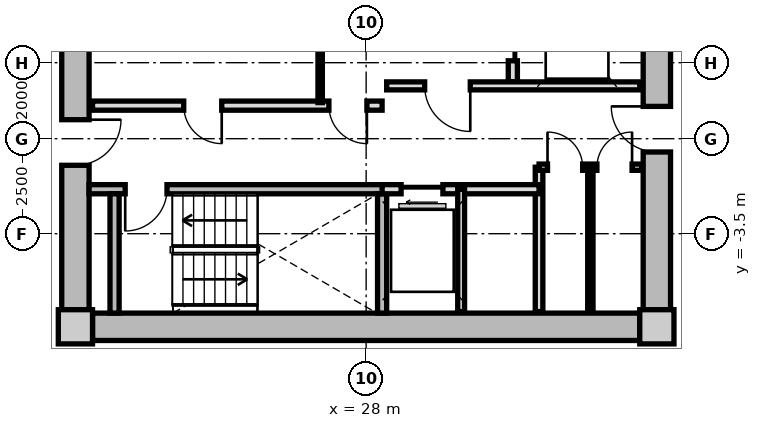
"""IFC4 building model, lengths in metres.
Left out: names, types, materials, properties, quantities, classifications, styles, units other than length and angle.
Written with IfcOpenShell. Run it as: python <this file> out.ifc"""

import sys

from ifc_helpers import new_model, si_unit, direction, frame, frame_2d, origin, origin_2d, place, context, subcontext, project, spatial, rectangle, extrude, source, transform, mapped, element, fill, save


model = new_model("IFC4")
c1 = context("Model", 3, precision=1e-05, world=origin(), true_north=direction((0.0, 1.0)))
c2 = subcontext(c1, "Body", "Model", "MODEL_VIEW")
j1 = project(units=[si_unit("LENGTHUNIT", "METRE"), si_unit("PLANEANGLEUNIT", "RADIAN")], contexts=[c1])
p1 = place(None, origin())
s1 = spatial("IfcSite", under=j1, at=p1, CompositionType="ELEMENT")
p2 = place(p1, origin())
s2 = spatial("IfcBuilding", under=s1, at=p2, CompositionType="ELEMENT")
p3 = place(p2, frame((0.0, 0.0, 108.45)))
s3 = spatial("IfcBuildingStorey", under=s2, at=p3, CompositionType="ELEMENT", Elevation=108.45)
m1 = source(origin(), c2, "Body", "SweptSolid", [
    extrude(rectangle(XDim=0.9, YDim=0.9, at=origin_2d()), origin(), (0.0, 0.0, 1.0), 3.05),
])
for number, where, z_axis, x_axis in (
    (1, (20.35, -5.95, 0.0), (0.0, 0.0, 1.0), (1.0, 0.0, 0.0)),
    (2, (35.65, -5.95, 0.0), (0.0, 0.0, 1.0), (1.0, 0.0, 0.0)),
):
    element("IfcColumn", number, at=place(p3, frame(where, z_axis=z_axis, x_axis=x_axis)), inside=s3, PredefinedType="COLUMN", context=c2, shape_type="MappedRepresentation", body=[
        mapped(m1, transform((0.0, 0.0, 0.0), x_axis=(1.0, 0.0, 0.0), y_axis=(0.0, 1.0, 0.0), z_axis=(0.0, 0.0, 1.0), scale=1.0)),
    ])
m2 = source(origin(), c2, "Body", "SweptSolid", [
    extrude(rectangle(XDim=14.4, YDim=0.72, at=frame_2d((7.2, 0.0))), origin(), (0.0, 0.0, 1.0), 2.79),
])
p4 = place(p3, frame((35.2, -5.95, 0.0), z_axis=(0.0, 0.0, 1.0), x_axis=(-1.0, 0.0, 0.0)))
e3 = element("IfcWall", 3, at=p4, inside=s3, PredefinedType="SHEAR", context=c2, shape_type="MappedRepresentation", body=[
    mapped(m2, transform((0.0, 0.0, 0.0), x_axis=(1.0, 0.0, 0.0), y_axis=(0.0, 1.0, 0.0), z_axis=(0.0, 0.0, 1.0), scale=1.0)),
])
m3 = source(origin(), c2, "Body", "SweptSolid", [
    extrude(rectangle(XDim=11.0, YDim=0.72, at=frame_2d((5.5, 0.0))), origin(), (0.0, 0.0, 1.0), 2.79),
])
p5 = place(p3, frame((20.35, -5.5, 0.0), z_axis=(0.0, 0.0, 1.0), x_axis=(0.0, 1.0, 0.0)))
e4 = element("IfcWall", 4, at=p5, inside=s3, PredefinedType="SHEAR", context=c2, shape_type="MappedRepresentation", body=[
    mapped(m3, transform((0.0, 0.0, 0.0), x_axis=(1.0, 0.0, 0.0), y_axis=(0.0, 1.0, 0.0), z_axis=(0.0, 0.0, 1.0), scale=1.0)),
])
p6 = place(p5, frame((3.8, 0.0, 0.0)))
e5 = element("IfcOpeningElement", 5, at=p6, cuts=e4, PredefinedType="OPENING", context=c2, shape_type="SweptSolid", body=[
    extrude(rectangle(XDim=1.2, YDim=2.15, at=frame_2d((0.6, 1.075))), frame((0.0, 0.37, 0.0), z_axis=(0.0, -1.0, 0.0), x_axis=(1.0, 0.0, 0.0)), (0.0, 0.0, 1.0), 0.74),
])
p7 = place(p3, frame((35.65, 5.5, 0.0), z_axis=(0.0, 0.0, 1.0), x_axis=(0.0, -1.0, 0.0)))
e6 = element("IfcWall", 6, at=p7, inside=s3, PredefinedType="SHEAR", context=c2, shape_type="MappedRepresentation", body=[
    mapped(m3, transform((0.0, 0.0, 0.0), x_axis=(1.0, 0.0, 0.0), y_axis=(0.0, 1.0, 0.0), z_axis=(0.0, 0.0, 1.0), scale=1.0)),
])
p8 = place(p7, frame((5.65, 0.0, 0.0)))
e7 = element("IfcOpeningElement", 7, at=p8, cuts=e6, PredefinedType="OPENING", context=c2, shape_type="SweptSolid", body=[
    extrude(rectangle(XDim=1.2, YDim=2.15, at=frame_2d((0.6, 1.075))), frame((0.0, 0.37, 0.0), z_axis=(0.0, -1.0, 0.0), x_axis=(1.0, 0.0, 0.0)), (0.0, 0.0, 1.0), 0.74),
])
m4 = source(origin(), c2, "Body", "SweptSolid", [
    extrude(rectangle(XDim=7.83, YDim=0.24, at=frame_2d((3.915, 0.0))), origin(), (0.0, 0.0, 1.0), 2.79),
])
p9 = place(p3, frame((20.71, -2.33, 0.0), z_axis=(0.0, 0.0, 1.0), x_axis=(1.0, 0.0, 0.0)))
e8 = element("IfcWall", 8, at=p9, inside=s3, PredefinedType="PARTITIONING", context=c2, shape_type="MappedRepresentation", body=[
    mapped(m4, transform((0.0, 0.0, 0.0), x_axis=(1.0, 0.0, 0.0), y_axis=(0.0, 1.0, 0.0), z_axis=(0.0, 0.0, 1.0), scale=1.0)),
])
p10 = place(p9, frame((0.95, 0.0, 0.0)))
e9 = element("IfcOpeningElement", 9, at=p10, cuts=e8, PredefinedType="OPENING", context=c2, shape_type="SweptSolid", body=[
    extrude(rectangle(XDim=1.1, YDim=2.15, at=frame_2d((0.55, 1.075))), frame((0.0, 0.13, 0.0), z_axis=(0.0, -1.0, 0.0), x_axis=(1.0, 0.0, 0.0)), (0.0, 0.0, 1.0), 0.26),
])
m5 = source(origin(), c2, "Body", "SweptSolid", [
    extrude(rectangle(XDim=3.14, YDim=0.24, at=frame_2d((1.57, 0.0))), origin(), (0.0, 0.0, 1.0), 2.79),
])
for number, where, z_axis, x_axis in (
    (10, (21.38, -5.59, 0.0), (0.0, 0.0, 1.0), (0.0, 1.0, 0.0)),
    (11, (28.42, -5.59, 0.0), (0.0, 0.0, 1.0), (0.0, 1.0, 0.0)),
):
    element("IfcWall", number, at=place(p3, frame(where, z_axis=z_axis, x_axis=x_axis)), inside=s3, PredefinedType="PARTITIONING", context=c2, shape_type="MappedRepresentation", body=[
        mapped(m5, transform((0.0, 0.0, 0.0), x_axis=(1.0, 0.0, 0.0), y_axis=(0.0, 1.0, 0.0), z_axis=(0.0, 0.0, 1.0), scale=1.0)),
    ])
m6 = source(origin(), c2, "Body", "SweptSolid", [
    extrude(rectangle(XDim=5.0, YDim=0.24, at=frame_2d((2.5, 0.0))), origin(), (0.0, 0.0, 1.0), 2.775),
])
p11 = place(p3, frame((31.86, 0.5, 0.0), z_axis=(0.0, 0.0, 1.0), x_axis=(0.0, 1.0, 0.0)))
e12 = element("IfcWall", 12, at=p11, inside=s3, PredefinedType="PARTITIONING", context=c2, shape_type="MappedRepresentation", body=[
    mapped(m6, transform((0.0, 0.0, 0.0), x_axis=(1.0, 0.0, 0.0), y_axis=(0.0, 1.0, 0.0), z_axis=(0.0, 0.0, 1.0), scale=1.0)),
])
p12 = place(p11, frame((3.05, 0.0, 0.0)))
e13 = element("IfcOpeningElement", 13, at=p12, cuts=e12, PredefinedType="OPENING", context=c2, shape_type="SweptSolid", body=[
    extrude(rectangle(XDim=1.3, YDim=2.2, at=frame_2d((0.65, 1.1))), frame((0.0, 0.13, 0.0), z_axis=(0.0, -1.0, 0.0), x_axis=(1.0, 0.0, 0.0)), (0.0, 0.0, 1.0), 0.26),
])
p13 = place(p11, frame((0.55, 0.0, 0.0)))
e14 = element("IfcOpeningElement", 14, at=p13, cuts=e12, PredefinedType="OPENING", context=c2, shape_type="SweptSolid", body=[
    extrude(rectangle(XDim=1.3, YDim=2.2, at=frame_2d((0.65, 1.1))), frame((0.0, 0.13, 0.0), z_axis=(0.0, -1.0, 0.0), x_axis=(1.0, 0.0, 0.0)), (0.0, 0.0, 1.0), 0.26),
])
m7 = source(origin(), c2, "Body", "SweptSolid", [
    extrude(rectangle(XDim=6.66, YDim=0.21, at=frame_2d((3.33, 0.0))), origin(), (0.0, 0.0, 1.0), 2.775),
])
p14 = place(p3, frame((28.54, 0.39, 0.0), z_axis=(0.0, 0.0, 1.0), x_axis=(1.0, 0.0, 0.0)))
e15 = element("IfcWall", 15, at=p14, inside=s3, PredefinedType="PARTITIONING", context=c2, shape_type="MappedRepresentation", body=[
    mapped(m7, transform((0.0, 0.0, 0.0), x_axis=(1.0, 0.0, 0.0), y_axis=(0.0, 1.0, 0.0), z_axis=(0.0, 0.0, 1.0), scale=1.0)),
])
p15 = place(p14, frame((1.0, 0.0, 0.0)))
e16 = element("IfcOpeningElement", 16, at=p15, cuts=e15, PredefinedType="OPENING", context=c2, shape_type="SweptSolid", body=[
    extrude(rectangle(XDim=1.2, YDim=2.15, at=frame_2d((0.6, 1.075))), frame((0.0, 0.115, 0.0), z_axis=(0.0, -1.0, 0.0), x_axis=(1.0, 0.0, 0.0)), (0.0, 0.0, 1.0), 0.23),
])
m8 = source(origin(), c2, "Body", "SweptSolid", [
    extrude(rectangle(XDim=7.62, YDim=0.24, at=frame_2d((3.81, 0.0))), origin(), (0.0, 0.0, 1.0), 2.775),
])
p16 = place(p3, frame((20.8, -0.13, 0.0), z_axis=(0.0, 0.0, 1.0), x_axis=(1.0, 0.0, 0.0)))
e17 = element("IfcWall", 17, at=p16, inside=s3, PredefinedType="PARTITIONING", context=c2, shape_type="MappedRepresentation", body=[
    mapped(m8, transform((0.0, 0.0, 0.0), x_axis=(1.0, 0.0, 0.0), y_axis=(0.0, 1.0, 0.0), z_axis=(0.0, 0.0, 1.0), scale=1.0)),
])
p17 = place(p16, frame((6.22, 0.0, 0.0)))
e18 = element("IfcOpeningElement", 18, at=p17, cuts=e17, PredefinedType="OPENING", context=c2, shape_type="SweptSolid", body=[
    extrude(rectangle(XDim=1.0, YDim=2.1, at=frame_2d((0.5, 1.05))), frame((0.0, 0.13, 0.0), z_axis=(0.0, -1.0, 0.0), x_axis=(1.0, 0.0, 0.0)), (0.0, 0.0, 1.0), 0.26),
])
p18 = place(p16, frame((2.4, 0.0, 0.0)))
e19 = element("IfcOpeningElement", 19, at=p18, cuts=e17, PredefinedType="OPENING", context=c2, shape_type="SweptSolid", body=[
    extrude(rectangle(XDim=1.0, YDim=2.1, at=frame_2d((0.5, 1.05))), frame((0.0, 0.13, 0.0), z_axis=(0.0, -1.0, 0.0), x_axis=(1.0, 0.0, 0.0)), (0.0, 0.0, 1.0), 0.26),
])
m9 = source(origin(), c2, "Body", "SweptSolid", [
    extrude(rectangle(XDim=2.33, YDim=0.115, at=frame_2d((1.165, 0.0))), origin(), (0.0, 0.0, 1.0), 2.775),
])
p19 = place(p3, frame((26.79, -0.05, 0.0), z_axis=(0.0, 0.0, 1.0), x_axis=(0.0, 1.0, 0.0)))
e20 = element("IfcWall", 20, at=p19, inside=s3, PredefinedType="PARTITIONING", context=c2, shape_type="MappedRepresentation", body=[
    mapped(m9, transform((0.0, 0.0, 0.0), x_axis=(1.0, 0.0, 0.0), y_axis=(0.0, 1.0, 0.0), z_axis=(0.0, 0.0, 1.0), scale=1.0)),
])
m10 = source(origin(), c2, "Body", "SweptSolid", [
    extrude(rectangle(XDim=3.8, YDim=0.2, at=frame_2d((1.9, 0.0))), origin(), (0.0, 0.0, 1.0), 2.775),
])
p20 = place(p3, frame((32.55, -5.55, 0.0), z_axis=(0.0, 0.0, 1.0), x_axis=(0.0, 1.0, 0.0)))
e21 = element("IfcWall", 21, at=p20, inside=s3, PredefinedType="PARTITIONING", context=c2, shape_type="MappedRepresentation", body=[
    mapped(m10, transform((0.0, 0.0, 0.0), x_axis=(1.0, 0.0, 0.0), y_axis=(0.0, 1.0, 0.0), z_axis=(0.0, 0.0, 1.0), scale=1.0)),
])
m11 = source(origin(), c2, "Body", "SweptSolid", [
    extrude(rectangle(XDim=4.13, YDim=0.24, at=frame_2d((2.065, 0.0))), origin(), (0.0, 0.0, 1.0), 2.775),
])
p21 = place(p3, frame((28.42, -2.33, 0.0), z_axis=(0.0, 0.0, 1.0), x_axis=(1.0, 0.0, 0.0)))
e22 = element("IfcWall", 22, at=p21, inside=s3, PredefinedType="PARTITIONING", context=c2, shape_type="MappedRepresentation", body=[
    mapped(m11, transform((0.0, 0.0, 0.0), x_axis=(1.0, 0.0, 0.0), y_axis=(0.0, 1.0, 0.0), z_axis=(0.0, 0.0, 1.0), scale=1.0)),
])
p22 = place(p21, frame((0.5, 0.0, 0.0)))
e23 = element("IfcOpeningElement", 23, at=p22, cuts=e22, PredefinedType="OPENING", context=c2, shape_type="SweptSolid", body=[
    extrude(rectangle(XDim=1.1, YDim=2.2, at=frame_2d((0.55, 1.1))), frame((0.0, 0.13, 0.0), z_axis=(0.0, -1.0, 0.0), x_axis=(1.0, 0.0, 0.0)), (0.0, 0.0, 1.0), 0.26),
])
m12 = source(origin(), c2, "Body", "SweptSolid", [
    extrude(rectangle(XDim=3.22, YDim=0.18, at=frame_2d((1.61, 0.0))), origin(), (0.0, 0.0, 1.0), 2.775),
])
p23 = place(p3, frame((30.5, -5.55, 0.0), z_axis=(0.0, 0.0, 1.0), x_axis=(0.0, 1.0, 0.0)))
e24 = element("IfcWall", 24, at=p23, inside=s3, PredefinedType="PARTITIONING", context=c2, shape_type="MappedRepresentation", body=[
    mapped(m12, transform((0.0, 0.0, 0.0), x_axis=(1.0, 0.0, 0.0), y_axis=(0.0, 1.0, 0.0), z_axis=(0.0, 0.0, 1.0), scale=1.0)),
])
m13 = source(origin(), c2, "Body", "SweptSolid", [
    extrude(rectangle(XDim=2.7, YDim=0.165, at=frame_2d((1.35, 0.0))), origin(), (0.0, 0.0, 1.0), 2.775),
])
p24 = place(p3, frame((32.55, -1.75, 0.0), z_axis=(0.0, 0.0, 1.0), x_axis=(1.0, 0.0, 0.0)))
e25 = element("IfcWall", 25, at=p24, inside=s3, PredefinedType="PARTITIONING", context=c2, shape_type="MappedRepresentation", body=[
    mapped(m13, transform((0.0, 0.0, 0.0), x_axis=(1.0, 0.0, 0.0), y_axis=(0.0, 1.0, 0.0), z_axis=(0.0, 0.0, 1.0), scale=1.0)),
])
p25 = place(p24, frame((0.222, 0.0, 0.0)))
e26 = element("IfcOpeningElement", 26, at=p25, cuts=e25, PredefinedType="OPENING", context=c2, shape_type="SweptSolid", body=[
    extrude(rectangle(XDim=0.925, YDim=2.1, at=frame_2d((0.462, 1.05))), frame((0.0, 0.093, 0.0), z_axis=(0.0, -1.0, 0.0), x_axis=(1.0, 0.0, 0.0)), (0.0, 0.0, 1.0), 0.185),
])
p26 = place(p24, frame((1.522, 0.0, 0.0)))
e27 = element("IfcOpeningElement", 27, at=p26, cuts=e25, PredefinedType="OPENING", context=c2, shape_type="SweptSolid", body=[
    extrude(rectangle(XDim=0.925, YDim=2.1, at=frame_2d((0.462, 1.05))), frame((0.0, 0.093, 0.0), z_axis=(0.0, -1.0, 0.0), x_axis=(1.0, 0.0, 0.0)), (0.0, 0.0, 1.0), 0.185),
])
m14 = source(origin(), c2, "Body", "SweptSolid", [
    extrude(rectangle(XDim=3.8, YDim=0.14, at=frame_2d((1.9, 0.0))), origin(), (0.0, 0.0, 1.0), 2.775),
])
p27 = place(p3, frame((33.9, -5.55, 0.0), z_axis=(0.0, 0.0, 1.0), x_axis=(0.0, 1.0, 0.0)))
e28 = element("IfcWall", 28, at=p27, inside=s3, PredefinedType="PARTITIONING", context=c2, shape_type="MappedRepresentation", body=[
    mapped(m14, transform((0.0, 0.0, 0.0), x_axis=(1.0, 0.0, 0.0), y_axis=(0.0, 1.0, 0.0), z_axis=(0.0, 0.0, 1.0), scale=1.0)),
])
m15 = source(origin(), c2, "Body", "SweptSolid", [
    extrude(rectangle(XDim=1.1, YDim=2.15, at=frame_2d((0.55, 1.075))), frame((0.0, 0.025, 0.0), z_axis=(0.0, -1.0, 0.0), x_axis=(1.0, 0.0, 0.0)), (0.0, 0.0, 1.0), 0.05),
])
p28 = place(p10, frame((1.1, 0.0, 0.0), z_axis=(0.0, 0.0, 1.0), x_axis=(-1.0, 0.0, 0.0)))
e29 = element("IfcDoor", 29, at=p28, inside=s3, OperationType="SINGLE_SWING_RIGHT", PredefinedType="DOOR", context=c2, shape_type="MappedRepresentation", body=[
    mapped(m15, transform((0.0, 0.0, 0.0), x_axis=(1.0, 0.0, 0.0), y_axis=(0.0, 1.0, 0.0), z_axis=(0.0, 0.0, 1.0), scale=1.0)),
])
fill(e9, e29)
m16 = source(origin(), c2, "Body", "SweptSolid", [
    extrude(rectangle(XDim=1.3, YDim=2.2, at=frame_2d((0.65, 1.1))), frame((0.0, 0.025, 0.0), z_axis=(0.0, -1.0, 0.0), x_axis=(1.0, 0.0, 0.0)), (0.0, 0.0, 1.0), 0.05),
])
p29 = place(p13, origin())
e30 = element("IfcDoor", 30, at=p29, inside=s3, OperationType="SLIDING_TO_RIGHT", PredefinedType="DOOR", context=c2, shape_type="MappedRepresentation", body=[
    mapped(m16, transform((0.0, 0.0, 0.0), x_axis=(1.0, 0.0, 0.0), y_axis=(0.0, 1.0, 0.0), z_axis=(0.0, 0.0, 1.0), scale=1.0)),
])
fill(e14, e30)
m17 = source(origin(), c2, "Body", "SweptSolid", [
    extrude(rectangle(XDim=1.2, YDim=2.15, at=frame_2d((0.6, 1.075))), frame((0.0, 0.025, 0.0), z_axis=(0.0, -1.0, 0.0), x_axis=(1.0, 0.0, 0.0)), (0.0, 0.0, 1.0), 0.05),
])
p30 = place(p15, frame((1.2, 0.0, 0.0), z_axis=(0.0, 0.0, 1.0), x_axis=(-1.0, 0.0, 0.0)))
e31 = element("IfcDoor", 31, at=p30, inside=s3, OperationType="SINGLE_SWING_LEFT", PredefinedType="DOOR", context=c2, shape_type="MappedRepresentation", body=[
    mapped(m17, transform((0.0, 0.0, 0.0), x_axis=(1.0, 0.0, 0.0), y_axis=(0.0, 1.0, 0.0), z_axis=(0.0, 0.0, 1.0), scale=1.0)),
])
fill(e16, e31)
p31 = place(p6, frame((1.2, 0.0, 0.0), z_axis=(0.0, 0.0, 1.0), x_axis=(-1.0, 0.0, 0.0)))
e32 = element("IfcDoor", 32, at=p31, inside=s3, OperationType="SINGLE_SWING_LEFT", PredefinedType="DOOR", context=c2, shape_type="MappedRepresentation", body=[
    mapped(m17, transform((0.0, 0.0, 0.0), x_axis=(1.0, 0.0, 0.0), y_axis=(0.0, 1.0, 0.0), z_axis=(0.0, 0.0, 1.0), scale=1.0)),
])
fill(e5, e32)
p32 = place(p8, frame((1.2, 0.0, 0.0), z_axis=(0.0, 0.0, 1.0), x_axis=(-1.0, 0.0, 0.0)))
e33 = element("IfcDoor", 33, at=p32, inside=s3, OperationType="SINGLE_SWING_RIGHT", PredefinedType="DOOR", context=c2, shape_type="MappedRepresentation", body=[
    mapped(m17, transform((0.0, 0.0, 0.0), x_axis=(1.0, 0.0, 0.0), y_axis=(0.0, 1.0, 0.0), z_axis=(0.0, 0.0, 1.0), scale=1.0)),
])
fill(e7, e33)
m18 = source(origin(), c2, "Body", "SweptSolid", [
    extrude(rectangle(XDim=1.0, YDim=2.1, at=frame_2d((0.5, 1.05))), frame((0.0, 0.025, 0.0), z_axis=(0.0, -1.0, 0.0), x_axis=(1.0, 0.0, 0.0)), (0.0, 0.0, 1.0), 0.05),
])
p33 = place(p17, frame((1.0, 0.0, 0.0), z_axis=(0.0, 0.0, 1.0), x_axis=(-1.0, 0.0, 0.0)))
e34 = element("IfcDoor", 34, at=p33, inside=s3, OperationType="SINGLE_SWING_LEFT", PredefinedType="DOOR", context=c2, shape_type="MappedRepresentation", body=[
    mapped(m18, transform((0.0, 0.0, 0.0), x_axis=(1.0, 0.0, 0.0), y_axis=(0.0, 1.0, 0.0), z_axis=(0.0, 0.0, 1.0), scale=1.0)),
])
fill(e18, e34)
p34 = place(p18, frame((1.0, 0.0, 0.0), z_axis=(0.0, 0.0, 1.0), x_axis=(-1.0, 0.0, 0.0)))
e35 = element("IfcDoor", 35, at=p34, inside=s3, OperationType="SINGLE_SWING_LEFT", PredefinedType="DOOR", context=c2, shape_type="MappedRepresentation", body=[
    mapped(m18, transform((0.0, 0.0, 0.0), x_axis=(1.0, 0.0, 0.0), y_axis=(0.0, 1.0, 0.0), z_axis=(0.0, 0.0, 1.0), scale=1.0)),
])
fill(e19, e35)
m19 = source(origin(), c2, "Body", "SweptSolid", [
    extrude(rectangle(XDim=1.1, YDim=2.2, at=frame_2d((0.55, 1.1))), frame((0.0, 0.025, 0.0), z_axis=(0.0, -1.0, 0.0), x_axis=(1.0, 0.0, 0.0)), (0.0, 0.0, 1.0), 0.05),
])
p35 = place(p22, frame((1.1, 0.0, 0.0), z_axis=(0.0, 0.0, 1.0), x_axis=(-1.0, 0.0, 0.0)))
e36 = element("IfcDoor", 36, at=p35, inside=s3, OperationType="SLIDING_TO_LEFT", PredefinedType="DOOR", context=c2, shape_type="MappedRepresentation", body=[
    mapped(m19, transform((0.0, 0.0, 0.0), x_axis=(1.0, 0.0, 0.0), y_axis=(0.0, 1.0, 0.0), z_axis=(0.0, 0.0, 1.0), scale=1.0)),
])
fill(e23, e36)
m20 = source(origin(), c2, "Body", "SweptSolid", [
    extrude(rectangle(XDim=0.925, YDim=2.1, at=frame_2d((0.462, 1.05))), frame((0.0, 0.025, 0.0), z_axis=(0.0, -1.0, 0.0), x_axis=(1.0, 0.0, 0.0)), (0.0, 0.0, 1.0), 0.05),
])
p36 = place(p25, origin())
e37 = element("IfcDoor", 37, at=p36, inside=s3, OperationType="SINGLE_SWING_LEFT", PredefinedType="DOOR", context=c2, shape_type="MappedRepresentation", body=[
    mapped(m20, transform((0.0, 0.0, 0.0), x_axis=(1.0, 0.0, 0.0), y_axis=(0.0, 1.0, 0.0), z_axis=(0.0, 0.0, 1.0), scale=1.0)),
])
fill(e26, e37)
p37 = place(p26, origin())
e38 = element("IfcDoor", 38, at=p37, inside=s3, OperationType="SINGLE_SWING_RIGHT", PredefinedType="DOOR", context=c2, shape_type="MappedRepresentation", body=[
    mapped(m20, transform((0.0, 0.0, 0.0), x_axis=(1.0, 0.0, 0.0), y_axis=(0.0, 1.0, 0.0), z_axis=(0.0, 0.0, 1.0), scale=1.0)),
])
fill(e27, e38)
save(model, sys.argv[1])
